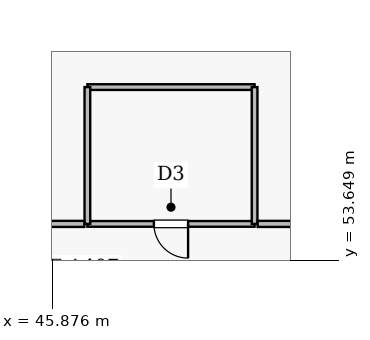
"""IFC4 building model, lengths in metres.
Left out: names, types, materials, properties, quantities, classifications, styles, units other than length and angle.
Written with IfcOpenShell. Run it as: python <this file> out.ifc"""

import sys

from ifc_helpers import new_model, si_unit, direction, frame, frame_2d, origin, place, context, subcontext, project, spatial, rectangle, extrude, element, fill, save


model = new_model("IFC4")
c1 = context("Model", 3, precision=1e-05, world=origin(), true_north=direction((0.0, 1.0)))
c2 = subcontext(c1, "Body", "Model", "MODEL_VIEW")
j1 = project(units=[si_unit("LENGTHUNIT", "METRE"), si_unit("PLANEANGLEUNIT", "RADIAN")], contexts=[c1])
p1 = place(None, origin())
s1 = spatial("IfcSite", under=j1, at=p1, CompositionType="ELEMENT")
p2 = place(p1, origin())
s2 = spatial("IfcBuilding", under=s1, at=p2, CompositionType="ELEMENT")
p3 = place(p2, frame((0.0, 0.0, 95.8)))
s3 = spatial("IfcBuildingStorey", under=s2, at=p3, CompositionType="ELEMENT", Elevation=95.8)
p4 = place(p3, frame((51.2, 54.6, 0.0), z_axis=(0.0, 0.0, 1.0), x_axis=(-1.0, 0.0, 0.0)))
e1 = element("IfcWall", 1, at=p4, inside=s3, PredefinedType="PLUMBINGWALL", context=c2, shape_type="SweptSolid", body=[
    extrude(rectangle(XDim=4.4, YDim=0.15, at=frame_2d((2.2, 0.0))), origin(), (0.0, 0.0, 1.0), 3.835),
])
p5 = place(p4, frame((1.75, 0.0, 0.0)))
e2 = element("IfcOpeningElement", 2, at=p5, cuts=e1, PredefinedType="OPENING", context=c2, shape_type="SweptSolid", body=[
    extrude(rectangle(XDim=0.9, YDim=2.1, at=frame_2d((0.45, 1.05))), frame((0.0, 0.085, 0.0), z_axis=(0.0, -1.0, 0.0), x_axis=(1.0, 0.0, 0.0)), (0.0, 0.0, 1.0), 0.17),
])
p6 = place(p3, frame((51.2, 58.2, 0.0), z_axis=(0.0, 0.0, 1.0), x_axis=(-1.0, 0.0, 0.0)))
e3 = element("IfcWall", 3, at=p6, inside=s3, PredefinedType="PLUMBINGWALL", context=c2, shape_type="SweptSolid", body=[
    extrude(rectangle(XDim=4.4, YDim=0.15, at=frame_2d((2.2, 0.0))), origin(), (0.0, 0.0, 1.0), 3.823),
])
p7 = place(p3, frame((51.2, 54.6, 0.0), z_axis=(0.0, 0.0, 1.0), x_axis=(0.0, 1.0, 0.0)))
e4 = element("IfcWall", 4, at=p7, inside=s3, PredefinedType="PLUMBINGWALL", context=c2, shape_type="SweptSolid", body=[
    extrude(rectangle(XDim=3.6, YDim=0.15, at=frame_2d((1.8, 0.0))), origin(), (0.0, 0.0, 1.0), 3.823),
])
p8 = place(p3, frame((46.8, 58.2, 0.0), z_axis=(0.0, 0.0, 1.0), x_axis=(0.0, -1.0, 0.0)))
e5 = element("IfcWall", 5, at=p8, inside=s3, PredefinedType="PLUMBINGWALL", context=c2, shape_type="SweptSolid", body=[
    extrude(rectangle(XDim=3.6, YDim=0.15, at=frame_2d((1.8, 0.0))), origin(), (0.0, 0.0, 1.0), 3.835),
])
p9 = place(p3, frame((46.72, 54.6, 0.0), z_axis=(0.0, 0.0, 1.0), x_axis=(-1.0, 0.0, 0.0)))
e6 = element("IfcWall", 6, at=p9, inside=s3, PredefinedType="SOLIDWALL", context=c2, shape_type="SweptSolid", body=[
    extrude(rectangle(XDim=2.64, YDim=0.16, at=frame_2d((1.32, 0.0))), origin(), (0.0, 0.0, 1.0), 3.835),
])
p10 = place(p3, frame((52.47, 54.6, 0.0), z_axis=(0.0, 0.0, 1.0), x_axis=(-1.0, 0.0, 0.0)))
e7 = element("IfcWall", 7, at=p10, inside=s3, PredefinedType="SOLIDWALL", context=c2, shape_type="SweptSolid", body=[
    extrude(rectangle(XDim=1.19, YDim=0.16, at=frame_2d((0.595, 0.0))), origin(), (0.0, 0.0, 1.0), 4.023),
])
p11 = place(p5, origin())
e8 = element("IfcDoor", 8, at=p11, inside=s3, OperationType="SINGLE_SWING_LEFT", PredefinedType="DOOR", context=c2, shape_type="SweptSolid", body=[
    extrude(rectangle(XDim=0.9, YDim=2.1, at=frame_2d((0.45, 1.05))), frame((0.0, 0.025, 0.0), z_axis=(0.0, -1.0, 0.0), x_axis=(1.0, 0.0, 0.0)), (0.0, 0.0, 1.0), 0.05),
])
fill(e2, e8)
save(model, sys.argv[1])
